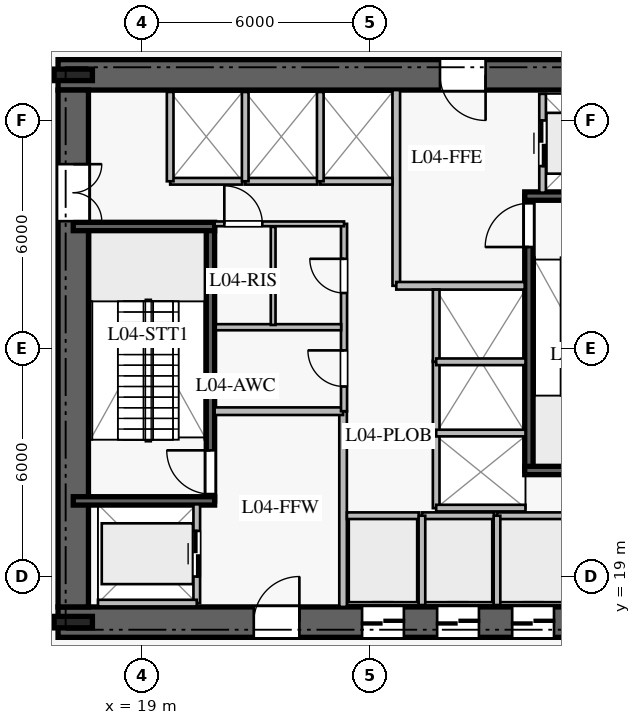
"""IFC4 building model, lengths in metres.
Left out: names, types, materials, properties, quantities, classifications, styles, units other than length and angle.
Written with IfcOpenShell. Run it as: python <this file> out.ifc"""

import sys

from ifc_helpers import new_model, si_unit, direction, frame, frame_2d, origin, origin_2d, place, context, subcontext, project, spatial, rectangle, i_section, extrude, element, fill, save


model = new_model("IFC4")
c1 = context("Model", 3, precision=1e-05, world=origin(), true_north=direction((0.0, 1.0)))
c2 = subcontext(c1, "Body", "Model", "MODEL_VIEW")
j1 = project(units=[si_unit("LENGTHUNIT", "METRE"), si_unit("PLANEANGLEUNIT", "RADIAN")], contexts=[c1])
p1 = place(None, origin())
s1 = spatial("IfcSite", under=j1, at=p1, CompositionType="ELEMENT")
p2 = place(p1, origin())
s2 = spatial("IfcBuilding", under=s1, at=p2, CompositionType="ELEMENT")
p3 = place(p2, frame((0.0, 0.0, 19.0)))
s3 = spatial("IfcBuildingStorey", under=s2, at=p3, CompositionType="ELEMENT", Elevation=19.0)
p4 = place(p3, frame((16.8, 17.8, 0.0), z_axis=(0.0, 0.0, 1.0), x_axis=(1.0, 0.0, 0.0)))
e1 = element("IfcWall", 1, at=p4, inside=s3, PredefinedType="SHEAR", context=c2, shape_type="SweptSolid", body=[
    extrude(rectangle(XDim=16.4, YDim=0.8, at=frame_2d((8.2, 0.0))), origin(), (0.0, 0.0, 1.0), 4.76),
])
p5 = place(p4, frame((5.15, 0.0, 0.0)))
e2 = element("IfcOpeningElement", 2, at=p5, cuts=e1, PredefinedType="OPENING", context=c2, shape_type="SweptSolid", body=[
    extrude(rectangle(XDim=1.2, YDim=2.25, at=frame_2d((0.6, 1.125))), frame((0.0, 0.41, 0.0), z_axis=(0.0, -1.0, 0.0), x_axis=(1.0, 0.0, 0.0)), (0.0, 0.0, 1.0), 0.82),
])
p6 = place(p4, frame((14.1, 0.0, 0.0)))
e3 = element("IfcOpeningElement", 3, at=p6, cuts=e1, PredefinedType="OPENING", context=c2, shape_type="SweptSolid", body=[
    extrude(rectangle(XDim=0.9, YDim=2.1, at=frame_2d((0.45, 1.05))), frame((0.0, 0.41, 0.0), z_axis=(0.0, -1.0, 0.0), x_axis=(1.0, 0.0, 0.0)), (0.0, 0.0, 1.0), 0.82),
])
p7 = place(p4, frame((8.0, 0.0, 0.0)))
e4 = element("IfcOpeningElement", 4, at=p7, cuts=e1, PredefinedType="OPENING", context=c2, shape_type="SweptSolid", body=[
    extrude(rectangle(XDim=1.1, YDim=2.2, at=frame_2d((0.55, 1.1))), frame((0.0, 0.41, 0.0), z_axis=(0.0, -1.0, 0.0), x_axis=(1.0, 0.0, 0.0)), (0.0, 0.0, 1.0), 0.82),
])
p8 = place(p4, frame((9.975, 0.0, 0.0)))
e5 = element("IfcOpeningElement", 5, at=p8, cuts=e1, PredefinedType="OPENING", context=c2, shape_type="SweptSolid", body=[
    extrude(rectangle(XDim=1.1, YDim=2.2, at=frame_2d((0.55, 1.1))), frame((0.0, 0.41, 0.0), z_axis=(0.0, -1.0, 0.0), x_axis=(1.0, 0.0, 0.0)), (0.0, 0.0, 1.0), 0.82),
])
p9 = place(p4, frame((11.95, 0.0, 0.0)))
e6 = element("IfcOpeningElement", 6, at=p9, cuts=e1, PredefinedType="OPENING", context=c2, shape_type="SweptSolid", body=[
    extrude(rectangle(XDim=1.1, YDim=2.2, at=frame_2d((0.55, 1.1))), frame((0.0, 0.41, 0.0), z_axis=(0.0, -1.0, 0.0), x_axis=(1.0, 0.0, 0.0)), (0.0, 0.0, 1.0), 0.82),
])
p10 = place(p3, frame((33.2, 32.2, 0.0), z_axis=(0.0, 0.0, 1.0), x_axis=(-1.0, 0.0, 0.0)))
e7 = element("IfcWall", 7, at=p10, inside=s3, PredefinedType="SHEAR", context=c2, shape_type="SweptSolid", body=[
    extrude(rectangle(XDim=16.4, YDim=0.8, at=frame_2d((8.2, 0.0))), origin(), (0.0, 0.0, 1.0), 4.76),
])
p11 = place(p10, frame((5.15, 0.0, 0.0)))
e8 = element("IfcOpeningElement", 8, at=p11, cuts=e7, PredefinedType="OPENING", context=c2, shape_type="SweptSolid", body=[
    extrude(rectangle(XDim=1.2, YDim=2.25, at=frame_2d((0.6, 1.125))), frame((0.0, 0.41, 0.0), z_axis=(0.0, -1.0, 0.0), x_axis=(1.0, 0.0, 0.0)), (0.0, 0.0, 1.0), 0.82),
])
p12 = place(p3, frame((17.2, 31.8, 0.0), z_axis=(0.0, 0.0, 1.0), x_axis=(0.0, -1.0, 0.0)))
e9 = element("IfcWall", 9, at=p12, inside=s3, PredefinedType="SHEAR", context=c2, shape_type="SweptSolid", body=[
    extrude(rectangle(XDim=13.6, YDim=0.8, at=frame_2d((6.8, 0.0))), origin(), (0.0, 0.0, 1.0), 4.76),
])
p13 = place(p12, frame((1.95, 0.0, 0.0)))
e10 = element("IfcOpeningElement", 10, at=p13, cuts=e9, PredefinedType="OPENING", context=c2, shape_type="SweptSolid", body=[
    extrude(rectangle(XDim=1.5, YDim=2.2, at=frame_2d((0.75, 1.1))), frame((0.0, 0.41, 0.0), z_axis=(0.0, -1.0, 0.0), x_axis=(1.0, 0.0, 0.0)), (0.0, 0.0, 1.0), 0.82),
])
for number, where, z_axis, x_axis in (
    (11, (17.2, 17.8, 0.0), (0.0, 0.0, 1.0), (1.0, 0.0, 0.0)),
    (12, (17.2, 32.2, 0.0), (0.0, 0.0, 1.0), (1.0, 0.0, 0.0)),
):
    element("IfcColumn", number, at=place(p3, frame(where, z_axis=z_axis, x_axis=x_axis)), inside=s3, PredefinedType="COLUMN", context=c2, shape_type="SweptSolid", body=[
        extrude(i_section(OverallWidth=0.302, OverallDepth=1.008, WebThickness=0.021, FlangeThickness=0.04, at=origin_2d()), origin(), (0.0, 0.0, 1.0), 5.0),
    ])
p14 = place(p3, frame((20.81, 20.99, 0.0), z_axis=(0.0, 0.0, 1.0), x_axis=(0.0, 1.0, 0.0)))
e13 = element("IfcWall", 13, at=p14, inside=s3, PredefinedType="SOLIDWALL", context=c2, shape_type="SweptSolid", body=[
    extrude(rectangle(XDim=7.22, YDim=0.22, at=frame_2d((3.61, 0.0))), origin(), (0.0, 0.0, 1.0), 4.76),
])
p15 = place(p14, frame((0.18, 0.0, 0.0)))
e14 = element("IfcOpeningElement", 14, at=p15, cuts=e13, PredefinedType="OPENING", context=c2, shape_type="SweptSolid", body=[
    extrude(rectangle(XDim=1.15, YDim=2.2, at=frame_2d((0.575, 1.1))), frame((0.0, 0.12, 0.0), z_axis=(0.0, -1.0, 0.0), x_axis=(1.0, 0.0, 0.0)), (0.0, 0.0, 1.0), 0.24),
])
for number, where, z_axis, x_axis in (
    (15, (17.2, 20.99, 0.0), (0.0, 0.0, 1.0), (1.0, 0.0, 0.0)),
    (16, (17.2, 28.21, 0.0), (0.0, 0.0, 1.0), (1.0, 0.0, 0.0)),
):
    element("IfcWall", number, at=place(p3, frame(where, z_axis=z_axis, x_axis=x_axis)), inside=s3, PredefinedType="SOLIDWALL", context=c2, shape_type="SweptSolid", body=[
        extrude(rectangle(XDim=3.72, YDim=0.22, at=frame_2d((1.86, 0.0))), origin(), (0.0, 0.0, 1.0), 4.76),
    ])
p16 = place(p3, frame((29.19, 21.79, 0.0), z_axis=(0.0, 0.0, 1.0), x_axis=(0.0, 1.0, 0.0)))
e17 = element("IfcWall", 17, at=p16, inside=s3, PredefinedType="SOLIDWALL", context=c2, shape_type="SweptSolid", body=[
    extrude(rectangle(XDim=7.22, YDim=0.22, at=frame_2d((3.61, 0.0))), origin(), (0.0, 0.0, 1.0), 4.76),
])
p17 = place(p16, frame((5.88, 0.0, 0.0)))
e18 = element("IfcOpeningElement", 18, at=p17, cuts=e17, PredefinedType="OPENING", context=c2, shape_type="SweptSolid", body=[
    extrude(rectangle(XDim=1.15, YDim=2.2, at=frame_2d((0.575, 1.1))), frame((0.0, 0.12, 0.0), z_axis=(0.0, -1.0, 0.0), x_axis=(1.0, 0.0, 0.0)), (0.0, 0.0, 1.0), 0.24),
])
for number, where, z_axis, x_axis in (
    (19, (29.08, 21.79, 0.0), (0.0, 0.0, 1.0), (1.0, 0.0, 0.0)),
    (20, (29.08, 29.01, 0.0), (0.0, 0.0, 1.0), (1.0, 0.0, 0.0)),
):
    element("IfcWall", number, at=place(p3, frame(where, z_axis=z_axis, x_axis=x_axis)), inside=s3, PredefinedType="SOLIDWALL", context=c2, shape_type="SweptSolid", body=[
        extrude(rectangle(XDim=3.72, YDim=0.22, at=frame_2d((1.86, 0.0))), origin(), (0.0, 0.0, 1.0), 4.76),
    ])
p18 = place(p3, frame((24.3, 18.2, 0.0), z_axis=(0.0, 0.0, 1.0), x_axis=(0.0, 1.0, 0.0)))
e21 = element("IfcWall", 21, at=p18, inside=s3, PredefinedType="PARTITIONING", context=c2, shape_type="SweptSolid", body=[
    extrude(rectangle(XDim=5.15, YDim=0.2, at=frame_2d((2.575, 0.0))), origin(), (0.0, 0.0, 1.0), 4.76),
])
p19 = place(p3, frame((20.92, 23.35, 0.0), z_axis=(0.0, 0.0, 1.0), x_axis=(1.0, 0.0, 0.0)))
e22 = element("IfcWall", 22, at=p19, inside=s3, PredefinedType="PARTITIONING", context=c2, shape_type="SweptSolid", body=[
    extrude(rectangle(XDim=3.38, YDim=0.2, at=frame_2d((1.69, 0.0))), origin(), (0.0, 0.0, 1.0), 4.76),
])
p20 = place(p3, frame((25.7, 26.65, 0.0), z_axis=(0.0, 0.0, 1.0), x_axis=(0.0, 1.0, 0.0)))
e23 = element("IfcWall", 23, at=p20, inside=s3, PredefinedType="PARTITIONING", context=c2, shape_type="SweptSolid", body=[
    extrude(rectangle(XDim=5.15, YDim=0.2, at=frame_2d((2.575, 0.0))), origin(), (0.0, 0.0, 1.0), 4.76),
])
p21 = place(p3, frame((25.7, 26.65, 0.0), z_axis=(0.0, 0.0, 1.0), x_axis=(1.0, 0.0, 0.0)))
e24 = element("IfcWall", 24, at=p21, inside=s3, PredefinedType="PARTITIONING", context=c2, shape_type="SweptSolid", body=[
    extrude(rectangle(XDim=3.38, YDim=0.2, at=frame_2d((1.69, 0.0))), origin(), (0.0, 0.0, 1.0), 4.76),
])
p22 = place(p3, frame((24.325, 23.35, 0.0), z_axis=(0.0, 0.0, 1.0), x_axis=(0.0, 1.0, 0.0)))
e25 = element("IfcWall", 25, at=p22, inside=s3, PredefinedType="PLUMBINGWALL", context=c2, shape_type="SweptSolid", body=[
    extrude(rectangle(XDim=4.93, YDim=0.16, at=frame_2d((2.465, 0.0))), origin(), (0.0, 0.0, 1.0), 4.76),
])
p23 = place(p22, frame((0.65, 0.0, 0.0)))
e26 = element("IfcOpeningElement", 26, at=p23, cuts=e25, PredefinedType="OPENING", context=c2, shape_type="SweptSolid", body=[
    extrude(rectangle(XDim=0.95, YDim=2.1, at=frame_2d((0.475, 1.05))), frame((0.0, 0.09, 0.0), z_axis=(0.0, -1.0, 0.0), x_axis=(1.0, 0.0, 0.0)), (0.0, 0.0, 1.0), 0.18),
])
p24 = place(p22, frame((3.11, 0.0, 0.0)))
e27 = element("IfcOpeningElement", 27, at=p24, cuts=e25, PredefinedType="OPENING", context=c2, shape_type="SweptSolid", body=[
    extrude(rectangle(XDim=0.9, YDim=2.1, at=frame_2d((0.45, 1.05))), frame((0.0, 0.09, 0.0), z_axis=(0.0, -1.0, 0.0), x_axis=(1.0, 0.0, 0.0)), (0.0, 0.0, 1.0), 0.18),
])
p25 = place(p3, frame((20.92, 28.28, 0.0), z_axis=(0.0, 0.0, 1.0), x_axis=(1.0, 0.0, 0.0)))
e28 = element("IfcWall", 28, at=p25, inside=s3, PredefinedType="PARTITIONING", context=c2, shape_type="SweptSolid", body=[
    extrude(rectangle(XDim=3.405, YDim=0.125, at=frame_2d((1.703, 0.0))), origin(), (0.0, 0.0, 1.0), 4.76),
])
p26 = place(p25, frame((0.255, 0.0, 0.0)))
e29 = element("IfcOpeningElement", 29, at=p26, cuts=e28, PredefinedType="OPENING", context=c2, shape_type="SweptSolid", body=[
    extrude(rectangle(XDim=1.0, YDim=2.15, at=frame_2d((0.5, 1.075))), frame((0.0, 0.073, 0.0), z_axis=(0.0, -1.0, 0.0), x_axis=(1.0, 0.0, 0.0)), (0.0, 0.0, 1.0), 0.145),
])
p27 = place(p3, frame((20.95, 25.56, 0.0), z_axis=(0.0, 0.0, 1.0), x_axis=(1.0, 0.0, 0.0)))
e30 = element("IfcWall", 30, at=p27, inside=s3, PredefinedType="PLUMBINGWALL", context=c2, shape_type="SweptSolid", body=[
    extrude(rectangle(XDim=3.3, YDim=0.16, at=frame_2d((1.65, 0.0))), origin(), (0.0, 0.0, 1.0), 4.76),
])
p28 = place(p3, frame((22.46, 25.62, 0.0), z_axis=(0.0, 0.0, 1.0), x_axis=(0.0, 1.0, 0.0)))
e31 = element("IfcWall", 31, at=p28, inside=s3, PredefinedType="PARTITIONING", context=c2, shape_type="SweptSolid", body=[
    extrude(rectangle(XDim=2.58, YDim=0.125, at=frame_2d((1.29, 0.0))), origin(), (0.0, 0.0, 1.0), 4.76),
])
p29 = place(p3, frame((24.4, 20.6, 0.0), z_axis=(0.0, 0.0, 1.0), x_axis=(1.0, 0.0, 0.0)))
e32 = element("IfcWall", 32, at=p29, inside=s3, PredefinedType="PARTITIONING", context=c2, shape_type="SweptSolid", body=[
    extrude(rectangle(XDim=1.9, YDim=0.175, at=frame_2d((0.95, 0.0))), origin(), (0.0, 0.0, 1.0), 4.76),
])
p30 = place(p3, frame((26.375, 20.6, 0.0), z_axis=(0.0, 0.0, 1.0), x_axis=(1.0, 0.0, 0.0)))
e33 = element("IfcWall", 33, at=p30, inside=s3, PredefinedType="PARTITIONING", context=c2, shape_type="SweptSolid", body=[
    extrude(rectangle(XDim=1.9, YDim=0.175, at=frame_2d((0.95, 0.0))), origin(), (0.0, 0.0, 1.0), 4.76),
])
p31 = place(p3, frame((26.375, 18.25, 0.0), z_axis=(0.0, 0.0, 1.0), x_axis=(0.0, 1.0, 0.0)))
e34 = element("IfcWall", 34, at=p31, inside=s3, PredefinedType="PARTITIONING", context=c2, shape_type="SweptSolid", body=[
    extrude(rectangle(XDim=2.35, YDim=0.175, at=frame_2d((1.175, 0.0))), origin(), (0.0, 0.0, 1.0), 4.76),
])
p32 = place(p3, frame((28.35, 20.6, 0.0), z_axis=(0.0, 0.0, 1.0), x_axis=(1.0, 0.0, 0.0)))
e35 = element("IfcWall", 35, at=p32, inside=s3, PredefinedType="PARTITIONING", context=c2, shape_type="SweptSolid", body=[
    extrude(rectangle(XDim=1.9, YDim=0.175, at=frame_2d((0.95, 0.0))), origin(), (0.0, 0.0, 1.0), 4.76),
])
p33 = place(p3, frame((28.35, 18.25, 0.0), z_axis=(0.0, 0.0, 1.0), x_axis=(0.0, 1.0, 0.0)))
e36 = element("IfcWall", 36, at=p33, inside=s3, PredefinedType="PARTITIONING", context=c2, shape_type="SweptSolid", body=[
    extrude(rectangle(XDim=2.35, YDim=0.175, at=frame_2d((1.175, 0.0))), origin(), (0.0, 0.0, 1.0), 4.76),
])
p34 = place(p3, frame((19.75, 29.4, 0.0), z_axis=(0.0, 0.0, 1.0), x_axis=(1.0, 0.0, 0.0)))
e37 = element("IfcWall", 37, at=p34, inside=s3, PredefinedType="PARTITIONING", context=c2, shape_type="SweptSolid", body=[
    extrude(rectangle(XDim=1.9, YDim=0.175, at=frame_2d((0.95, 0.0))), origin(), (0.0, 0.0, 1.0), 4.76),
])
p35 = place(p3, frame((19.75, 29.4, 0.0), z_axis=(0.0, 0.0, 1.0), x_axis=(0.0, 1.0, 0.0)))
e38 = element("IfcWall", 38, at=p35, inside=s3, PredefinedType="PARTITIONING", context=c2, shape_type="SweptSolid", body=[
    extrude(rectangle(XDim=2.35, YDim=0.175, at=frame_2d((1.175, 0.0))), origin(), (0.0, 0.0, 1.0), 4.76),
])
p36 = place(p3, frame((21.725, 29.4, 0.0), z_axis=(0.0, 0.0, 1.0), x_axis=(1.0, 0.0, 0.0)))
e39 = element("IfcWall", 39, at=p36, inside=s3, PredefinedType="PARTITIONING", context=c2, shape_type="SweptSolid", body=[
    extrude(rectangle(XDim=1.9, YDim=0.175, at=frame_2d((0.95, 0.0))), origin(), (0.0, 0.0, 1.0), 4.76),
])
p37 = place(p3, frame((21.725, 29.4, 0.0), z_axis=(0.0, 0.0, 1.0), x_axis=(0.0, 1.0, 0.0)))
e40 = element("IfcWall", 40, at=p37, inside=s3, PredefinedType="PARTITIONING", context=c2, shape_type="SweptSolid", body=[
    extrude(rectangle(XDim=2.35, YDim=0.175, at=frame_2d((1.175, 0.0))), origin(), (0.0, 0.0, 1.0), 4.76),
])
p38 = place(p3, frame((23.7, 29.4, 0.0), z_axis=(0.0, 0.0, 1.0), x_axis=(1.0, 0.0, 0.0)))
e41 = element("IfcWall", 41, at=p38, inside=s3, PredefinedType="PARTITIONING", context=c2, shape_type="SweptSolid", body=[
    extrude(rectangle(XDim=1.9, YDim=0.175, at=frame_2d((0.95, 0.0))), origin(), (0.0, 0.0, 1.0), 4.76),
])
p39 = place(p3, frame((23.7, 29.4, 0.0), z_axis=(0.0, 0.0, 1.0), x_axis=(0.0, 1.0, 0.0)))
e42 = element("IfcWall", 42, at=p39, inside=s3, PredefinedType="PARTITIONING", context=c2, shape_type="SweptSolid", body=[
    extrude(rectangle(XDim=2.35, YDim=0.175, at=frame_2d((1.175, 0.0))), origin(), (0.0, 0.0, 1.0), 4.76),
])
p40 = place(p3, frame((26.75, 20.8, 0.0), z_axis=(0.0, 0.0, 1.0), x_axis=(0.0, 1.0, 0.0)))
e43 = element("IfcWall", 43, at=p40, inside=s3, PredefinedType="PARTITIONING", context=c2, shape_type="SweptSolid", body=[
    extrude(rectangle(XDim=1.9, YDim=0.175, at=frame_2d((0.95, 0.0))), origin(), (0.0, 0.0, 1.0), 4.76),
])
p41 = place(p3, frame((26.75, 20.8, 0.0), z_axis=(0.0, 0.0, 1.0), x_axis=(1.0, 0.0, 0.0)))
e44 = element("IfcWall", 44, at=p41, inside=s3, PredefinedType="PARTITIONING", context=c2, shape_type="SweptSolid", body=[
    extrude(rectangle(XDim=2.35, YDim=0.175, at=frame_2d((1.175, 0.0))), origin(), (0.0, 0.0, 1.0), 4.76),
])
p42 = place(p3, frame((26.75, 22.775, 0.0), z_axis=(0.0, 0.0, 1.0), x_axis=(0.0, 1.0, 0.0)))
e45 = element("IfcWall", 45, at=p42, inside=s3, PredefinedType="PARTITIONING", context=c2, shape_type="SweptSolid", body=[
    extrude(rectangle(XDim=1.9, YDim=0.175, at=frame_2d((0.95, 0.0))), origin(), (0.0, 0.0, 1.0), 4.76),
])
p43 = place(p3, frame((26.75, 22.775, 0.0), z_axis=(0.0, 0.0, 1.0), x_axis=(1.0, 0.0, 0.0)))
e46 = element("IfcWall", 46, at=p43, inside=s3, PredefinedType="PARTITIONING", context=c2, shape_type="SweptSolid", body=[
    extrude(rectangle(XDim=2.35, YDim=0.175, at=frame_2d((1.175, 0.0))), origin(), (0.0, 0.0, 1.0), 4.76),
])
p44 = place(p3, frame((26.75, 24.65, 0.0), z_axis=(0.0, 0.0, 1.0), x_axis=(0.0, 1.0, 0.0)))
e47 = element("IfcWall", 47, at=p44, inside=s3, PredefinedType="PARTITIONING", context=c2, shape_type="SweptSolid", body=[
    extrude(rectangle(XDim=1.9, YDim=0.175, at=frame_2d((0.95, 0.0))), origin(), (0.0, 0.0, 1.0), 4.76),
])
p45 = place(p3, frame((26.75, 24.65, 0.0), z_axis=(0.0, 0.0, 1.0), x_axis=(1.0, 0.0, 0.0)))
e48 = element("IfcWall", 48, at=p45, inside=s3, PredefinedType="PARTITIONING", context=c2, shape_type="SweptSolid", body=[
    extrude(rectangle(XDim=2.35, YDim=0.175, at=frame_2d((1.175, 0.0))), origin(), (0.0, 0.0, 1.0), 4.76),
])
p46 = place(p3, frame((20.45, 18.3, 0.0), z_axis=(0.0, 0.0, 1.0), x_axis=(0.0, 1.0, 0.0)))
e49 = element("IfcWall", 49, at=p46, inside=s3, PredefinedType="PARTITIONING", context=c2, shape_type="SweptSolid", body=[
    extrude(rectangle(XDim=2.6, YDim=0.175, at=frame_2d((1.3, 0.0))), origin(), (0.0, 0.0, 1.0), 4.76),
])
p47 = place(p46, frame((0.7, 0.0, 0.0)))
e50 = element("IfcOpeningElement", 50, at=p47, cuts=e49, PredefinedType="OPENING", context=c2, shape_type="SweptSolid", body=[
    extrude(rectangle(XDim=1.2, YDim=2.2, at=frame_2d((0.6, 1.1))), frame((0.0, 0.098, 0.0), z_axis=(0.0, -1.0, 0.0), x_axis=(1.0, 0.0, 0.0)), (0.0, 0.0, 1.0), 0.195),
])
p48 = place(p3, frame((17.85, 18.3, 0.0), z_axis=(0.0, 0.0, 1.0), x_axis=(1.0, 0.0, 0.0)))
e51 = element("IfcWall", 51, at=p48, inside=s3, PredefinedType="PARTITIONING", context=c2, shape_type="SweptSolid", body=[
    extrude(rectangle(XDim=2.6, YDim=0.175, at=frame_2d((1.3, 0.0))), origin(), (0.0, 0.0, 1.0), 4.76),
])
p49 = place(p3, frame((29.55, 29.1, 0.0), z_axis=(0.0, 0.0, 1.0), x_axis=(0.0, 1.0, 0.0)))
e52 = element("IfcWall", 52, at=p49, inside=s3, PredefinedType="PARTITIONING", context=c2, shape_type="SweptSolid", body=[
    extrude(rectangle(XDim=2.6, YDim=0.175, at=frame_2d((1.3, 0.0))), origin(), (0.0, 0.0, 1.0), 4.76),
])
p50 = place(p49, frame((0.7, 0.0, 0.0)))
e53 = element("IfcOpeningElement", 53, at=p50, cuts=e52, PredefinedType="OPENING", context=c2, shape_type="SweptSolid", body=[
    extrude(rectangle(XDim=1.2, YDim=2.2, at=frame_2d((0.6, 1.1))), frame((0.0, 0.098, 0.0), z_axis=(0.0, -1.0, 0.0), x_axis=(1.0, 0.0, 0.0)), (0.0, 0.0, 1.0), 0.195),
])
p51 = place(p15, origin())
e54 = element("IfcDoor", 54, at=p51, inside=s3, OperationType="SINGLE_SWING_RIGHT", PredefinedType="DOOR", context=c2, shape_type="SweptSolid", body=[
    extrude(rectangle(XDim=1.15, YDim=2.2, at=frame_2d((0.575, 1.1))), frame((0.0, 0.025, 0.0), z_axis=(0.0, -1.0, 0.0), x_axis=(1.0, 0.0, 0.0)), (0.0, 0.0, 1.0), 0.05),
])
fill(e14, e54)
p52 = place(p17, origin())
e55 = element("IfcDoor", 55, at=p52, inside=s3, OperationType="SINGLE_SWING_LEFT", PredefinedType="DOOR", context=c2, shape_type="SweptSolid", body=[
    extrude(rectangle(XDim=1.15, YDim=2.2, at=frame_2d((0.575, 1.1))), frame((0.0, 0.025, 0.0), z_axis=(0.0, -1.0, 0.0), x_axis=(1.0, 0.0, 0.0)), (0.0, 0.0, 1.0), 0.05),
])
fill(e18, e55)
p53 = place(p5, origin())
e56 = element("IfcDoor", 56, at=p53, inside=s3, OperationType="SINGLE_SWING_RIGHT", PredefinedType="DOOR", context=c2, shape_type="SweptSolid", body=[
    extrude(rectangle(XDim=1.2, YDim=2.25, at=frame_2d((0.6, 1.125))), frame((0.0, 0.025, 0.0), z_axis=(0.0, -1.0, 0.0), x_axis=(1.0, 0.0, 0.0)), (0.0, 0.0, 1.0), 0.05),
])
fill(e2, e56)
p54 = place(p11, origin())
e57 = element("IfcDoor", 57, at=p54, inside=s3, OperationType="SINGLE_SWING_LEFT", PredefinedType="DOOR", context=c2, shape_type="SweptSolid", body=[
    extrude(rectangle(XDim=1.2, YDim=2.25, at=frame_2d((0.6, 1.125))), frame((0.0, 0.025, 0.0), z_axis=(0.0, -1.0, 0.0), x_axis=(1.0, 0.0, 0.0)), (0.0, 0.0, 1.0), 0.05),
])
fill(e8, e57)
p55 = place(p13, origin())
e58 = element("IfcDoor", 58, at=p55, inside=s3, OperationType="DOUBLE_DOOR_SINGLE_SWING", PredefinedType="DOOR", context=c2, shape_type="SweptSolid", body=[
    extrude(rectangle(XDim=1.5, YDim=2.2, at=frame_2d((0.75, 1.1))), frame((0.0, 0.025, 0.0), z_axis=(0.0, -1.0, 0.0), x_axis=(1.0, 0.0, 0.0)), (0.0, 0.0, 1.0), 0.05),
])
fill(e10, e58)
p56 = place(p23, origin())
e59 = element("IfcDoor", 59, at=p56, inside=s3, OperationType="SINGLE_SWING_RIGHT", PredefinedType="DOOR", context=c2, shape_type="SweptSolid", body=[
    extrude(rectangle(XDim=0.95, YDim=2.1, at=frame_2d((0.475, 1.05))), frame((0.0, 0.025, 0.0), z_axis=(0.0, -1.0, 0.0), x_axis=(1.0, 0.0, 0.0)), (0.0, 0.0, 1.0), 0.05),
])
fill(e26, e59)
p57 = place(p26, origin())
e60 = element("IfcDoor", 60, at=p57, inside=s3, OperationType="SINGLE_SWING_LEFT", PredefinedType="DOOR", context=c2, shape_type="SweptSolid", body=[
    extrude(rectangle(XDim=1.0, YDim=2.15, at=frame_2d((0.5, 1.075))), frame((0.0, 0.025, 0.0), z_axis=(0.0, -1.0, 0.0), x_axis=(1.0, 0.0, 0.0)), (0.0, 0.0, 1.0), 0.05),
])
fill(e29, e60)
p58 = place(p24, origin())
e61 = element("IfcDoor", 61, at=p58, inside=s3, OperationType="SINGLE_SWING_RIGHT", PredefinedType="DOOR", context=c2, shape_type="SweptSolid", body=[
    extrude(rectangle(XDim=0.9, YDim=2.1, at=frame_2d((0.45, 1.05))), frame((0.0, 0.025, 0.0), z_axis=(0.0, -1.0, 0.0), x_axis=(1.0, 0.0, 0.0)), (0.0, 0.0, 1.0), 0.05),
])
fill(e27, e61)
p59 = place(p7, origin())
e62 = element("IfcDoor", 62, at=p59, inside=s3, OperationType="DOUBLE_DOOR_SLIDING", PredefinedType="DOOR", context=c2, shape_type="SweptSolid", body=[
    extrude(rectangle(XDim=1.1, YDim=2.2, at=frame_2d((0.55, 1.1))), frame((0.0, 0.025, 0.0), z_axis=(0.0, -1.0, 0.0), x_axis=(1.0, 0.0, 0.0)), (0.0, 0.0, 1.0), 0.05),
])
fill(e4, e62)
p60 = place(p8, origin())
e63 = element("IfcDoor", 63, at=p60, inside=s3, OperationType="DOUBLE_DOOR_SLIDING", PredefinedType="DOOR", context=c2, shape_type="SweptSolid", body=[
    extrude(rectangle(XDim=1.1, YDim=2.2, at=frame_2d((0.55, 1.1))), frame((0.0, 0.025, 0.0), z_axis=(0.0, -1.0, 0.0), x_axis=(1.0, 0.0, 0.0)), (0.0, 0.0, 1.0), 0.05),
])
fill(e5, e63)
p61 = place(p9, origin())
e64 = element("IfcDoor", 64, at=p61, inside=s3, OperationType="DOUBLE_DOOR_SLIDING", PredefinedType="DOOR", context=c2, shape_type="SweptSolid", body=[
    extrude(rectangle(XDim=1.1, YDim=2.2, at=frame_2d((0.55, 1.1))), frame((0.0, 0.025, 0.0), z_axis=(0.0, -1.0, 0.0), x_axis=(1.0, 0.0, 0.0)), (0.0, 0.0, 1.0), 0.05),
])
fill(e6, e64)
p62 = place(p47, origin())
e65 = element("IfcDoor", 65, at=p62, inside=s3, OperationType="DOUBLE_DOOR_SLIDING", PredefinedType="DOOR", context=c2, shape_type="SweptSolid", body=[
    extrude(rectangle(XDim=1.2, YDim=2.2, at=frame_2d((0.6, 1.1))), frame((0.0, 0.025, 0.0), z_axis=(0.0, -1.0, 0.0), x_axis=(1.0, 0.0, 0.0)), (0.0, 0.0, 1.0), 0.05),
])
fill(e50, e65)
p63 = place(p50, origin())
e66 = element("IfcDoor", 66, at=p63, inside=s3, OperationType="DOUBLE_DOOR_SLIDING", PredefinedType="DOOR", context=c2, shape_type="SweptSolid", body=[
    extrude(rectangle(XDim=1.2, YDim=2.2, at=frame_2d((0.6, 1.1))), frame((0.0, 0.025, 0.0), z_axis=(0.0, -1.0, 0.0), x_axis=(1.0, 0.0, 0.0)), (0.0, 0.0, 1.0), 0.05),
])
fill(e53, e66)
save(model, sys.argv[1])
